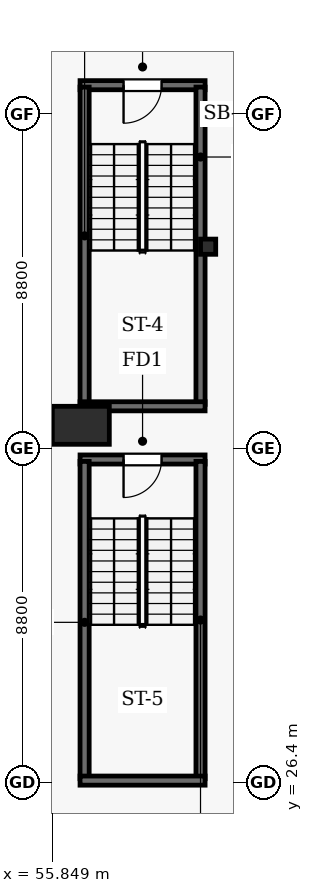
"""IFC4 building model, lengths in metres.
Left out: names, types, materials, properties, quantities, classifications, styles, units other than length and angle.
Written with IfcOpenShell. Run it as: python <this file> out.ifc"""

import sys

from ifc_helpers import new_model, si_unit, direction, frame, frame_2d, origin, origin_2d, place, context, subcontext, project, spatial, rectangle, i_section, extrude, element, fill, save


model = new_model("IFC4")
c1 = context("Model", 3, precision=1e-05, world=origin(), true_north=direction((0.0, 1.0)))
c2 = subcontext(c1, "Body", "Model", "MODEL_VIEW")
j1 = project(units=[si_unit("LENGTHUNIT", "METRE"), si_unit("PLANEANGLEUNIT", "RADIAN")], contexts=[c1])
p1 = place(None, origin())
s1 = spatial("IfcSite", under=j1, at=p1, CompositionType="ELEMENT")
p2 = place(p1, origin())
s2 = spatial("IfcBuilding", under=s1, at=p2, CompositionType="ELEMENT")
p3 = place(p2, frame((0.0, 0.0, -15.6)))
s3 = spatial("IfcBuildingStorey", under=s2, at=p3, CompositionType="ELEMENT", Elevation=-15.6)
p4 = place(p3, frame((56.6, 35.8, 0.0), z_axis=(0.0, 0.0, 1.0), x_axis=(1.0, 0.0, 0.0)))
e1 = element("IfcColumn", 1, at=p4, inside=s3, PredefinedType="COLUMN", context=c2, shape_type="SweptSolid", body=[
    extrude(rectangle(XDim=1.5, YDim=1.0, at=origin_2d()), origin(), (0.0, 0.0, 1.0), 3.9),
])
p5 = place(p3, frame((59.95, 40.5, 0.0), z_axis=(0.0, 0.0, 1.0), x_axis=(1.0, 0.0, 0.0)))
e2 = element("IfcColumn", 2, at=p5, inside=s3, PredefinedType="PILASTER", context=c2, shape_type="SweptSolid", body=[
    extrude(i_section(OverallWidth=0.4, OverallDepth=0.4, WebThickness=0.013, FlangeThickness=0.021, FilletRadius=0.022, at=origin_2d()), origin(), (0.0, 0.0, 1.0), 3.9),
])
p6 = place(p3, frame((56.58, 44.75, 0.0), z_axis=(0.0, 0.0, 1.0), x_axis=(1.0, 0.0, 0.0)))
e3 = element("IfcWall", 3, at=p6, inside=s3, PredefinedType="SHEAR", context=c2, shape_type="SweptSolid", body=[
    extrude(rectangle(XDim=3.29, YDim=0.24, at=frame_2d((1.645, 0.0))), origin(), (0.0, 0.0, 1.0), 3.58),
])
p7 = place(p6, frame((1.145, 0.0, 0.0)))
e4 = element("IfcOpeningElement", 4, at=p7, cuts=e3, PredefinedType="OPENING", context=c2, shape_type="SweptSolid", body=[
    extrude(rectangle(XDim=1.0, YDim=2.15, at=frame_2d((0.5, 1.075))), frame((0.0, 0.13, 0.0), z_axis=(0.0, -1.0, 0.0), x_axis=(1.0, 0.0, 0.0)), (0.0, 0.0, 1.0), 0.26),
])
p8 = place(p3, frame((56.58, 34.9, 0.0), z_axis=(0.0, 0.0, 1.0), x_axis=(1.0, 0.0, 0.0)))
e5 = element("IfcWall", 5, at=p8, inside=s3, PredefinedType="SHEAR", context=c2, shape_type="SweptSolid", body=[
    extrude(rectangle(XDim=3.29, YDim=0.24, at=frame_2d((1.645, 0.0))), origin(), (0.0, 0.0, 1.0), 3.58),
])
p9 = place(p8, frame((1.145, 0.0, 0.0)))
e6 = element("IfcOpeningElement", 6, at=p9, cuts=e5, PredefinedType="OPENING", context=c2, shape_type="SweptSolid", body=[
    extrude(rectangle(XDim=1.0, YDim=2.15, at=frame_2d((0.5, 1.075))), frame((0.0, 0.13, 0.0), z_axis=(0.0, -1.0, 0.0), x_axis=(1.0, 0.0, 0.0)), (0.0, 0.0, 1.0), 0.26),
])
for number, where, z_axis, x_axis in (
    (7, (56.7, 36.35, 0.0), (0.0, 0.0, 1.0), (0.0, 1.0, 0.0)),
    (8, (59.75, 36.35, 0.0), (0.0, 0.0, 1.0), (0.0, 1.0, 0.0)),
):
    element("IfcWall", number, at=place(p3, frame(where, z_axis=z_axis, x_axis=x_axis)), inside=s3, PredefinedType="SHEAR", context=c2, shape_type="SweptSolid", body=[
        extrude(rectangle(XDim=8.35, YDim=0.24, at=frame_2d((4.175, 0.0))), origin(), (0.0, 0.0, 1.0), 3.58),
    ])
for number, where, z_axis, x_axis in (
    (9, (56.7, 26.5, 0.0), (0.0, 0.0, 1.0), (0.0, 1.0, 0.0)),
    (10, (59.75, 26.5, 0.0), (0.0, 0.0, 1.0), (0.0, 1.0, 0.0)),
):
    element("IfcWall", number, at=place(p3, frame(where, z_axis=z_axis, x_axis=x_axis)), inside=s3, PredefinedType="SHEAR", context=c2, shape_type="SweptSolid", body=[
        extrude(rectangle(XDim=8.35, YDim=0.24, at=frame_2d((4.175, 0.0))), origin(), (0.0, 0.0, 1.0), 3.58),
    ])
for number, where, z_axis, x_axis in (
    (11, (56.58, 36.3, 0.0), (0.0, 0.0, 1.0), (1.0, 0.0, 0.0)),
    (12, (56.58, 26.45, 0.0), (0.0, 0.0, 1.0), (1.0, 0.0, 0.0)),
):
    element("IfcWall", number, at=place(p3, frame(where, z_axis=z_axis, x_axis=x_axis)), inside=s3, PredefinedType="SHEAR", context=c2, shape_type="SweptSolid", body=[
        extrude(rectangle(XDim=3.29, YDim=0.24, at=frame_2d((1.645, 0.0))), origin(), (0.0, 0.0, 1.0), 3.58),
    ])
p10 = place(p7, frame((1.0, 0.0, 0.0), z_axis=(0.0, 0.0, 1.0), x_axis=(-1.0, 0.0, 0.0)))
e13 = element("IfcDoor", 13, at=p10, inside=s3, OperationType="SINGLE_SWING_LEFT", PredefinedType="DOOR", context=c2, shape_type="SweptSolid", body=[
    extrude(rectangle(XDim=1.0, YDim=2.15, at=frame_2d((0.5, 1.075))), frame((0.0, 0.025, 0.0), z_axis=(0.0, -1.0, 0.0), x_axis=(1.0, 0.0, 0.0)), (0.0, 0.0, 1.0), 0.05),
])
fill(e4, e13)
p11 = place(p9, frame((1.0, 0.0, 0.0), z_axis=(0.0, 0.0, 1.0), x_axis=(-1.0, 0.0, 0.0)))
e14 = element("IfcDoor", 14, at=p11, inside=s3, OperationType="SINGLE_SWING_LEFT", PredefinedType="DOOR", context=c2, shape_type="SweptSolid", body=[
    extrude(rectangle(XDim=1.0, YDim=2.15, at=frame_2d((0.5, 1.075))), frame((0.0, 0.025, 0.0), z_axis=(0.0, -1.0, 0.0), x_axis=(1.0, 0.0, 0.0)), (0.0, 0.0, 1.0), 0.05),
])
fill(e6, e14)
save(model, sys.argv[1])
